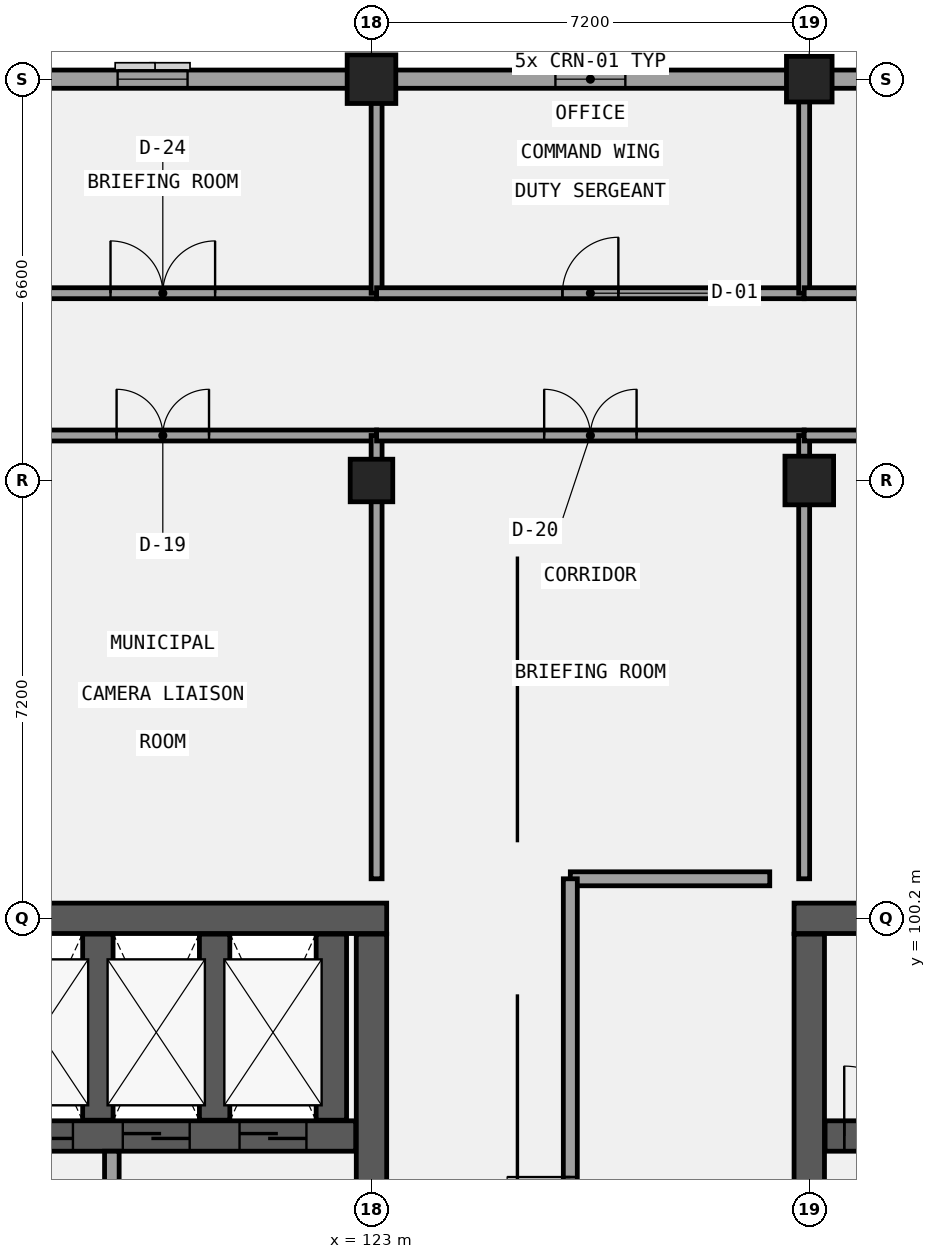
"""IFC4 building model, lengths in metres.
Left out: names, types, materials, properties, quantities, classifications, styles, units other than length and angle.
Written with IfcOpenShell. Run it as: python <this file> out.ifc"""

import sys

from ifc_helpers import new_model, si_unit, direction, frame, frame_2d, origin, origin_2d, place, context, subcontext, project, spatial, rectangle, extrude, element, fill, save


model = new_model("IFC4")
c1 = context("Model", 3, precision=1e-05, world=origin(), true_north=direction((0.0, 1.0)))
c2 = subcontext(c1, "Body", "Model", "MODEL_VIEW")
j1 = project(units=[si_unit("LENGTHUNIT", "METRE"), si_unit("PLANEANGLEUNIT", "RADIAN")], contexts=[c1])
p1 = place(None, origin())
s1 = spatial("IfcSite", under=j1, at=p1, CompositionType="ELEMENT")
p2 = place(p1, origin())
s2 = spatial("IfcBuilding", under=s1, at=p2, CompositionType="ELEMENT")
p3 = place(p2, frame((0.0, 0.0, 5.4)))
s3 = spatial("IfcBuildingStorey", under=s2, at=p3, CompositionType="ELEMENT", Elevation=5.4)
p4 = place(p3, frame((108.35, 100.2, 0.0), z_axis=(0.0, 0.0, 1.0), x_axis=(1.0, 0.0, 0.0)))
e1 = element("IfcWall", 1, at=p4, inside=s3, PredefinedType="SHEAR", context=c2, shape_type="SweptSolid", body=[
    extrude(rectangle(XDim=14.9, YDim=0.5, at=frame_2d((7.45, 0.0))), origin(), (0.0, 0.0, 1.0), 4.2),
])
p5 = place(p3, frame((123.0, 93.26, 0.0), z_axis=(0.0, 0.0, 1.0), x_axis=(0.0, 1.0, 0.0)))
e2 = element("IfcWall", 2, at=p5, inside=s3, PredefinedType="SHEAR", context=c2, shape_type="SweptSolid", body=[
    extrude(rectangle(XDim=6.68, YDim=0.5, at=frame_2d((3.34, 0.0))), origin(), (0.0, 0.0, 1.0), 4.2),
])
p6 = place(p3, frame((108.86, 96.62, 0.0), z_axis=(0.0, 0.0, 1.0), x_axis=(1.0, 0.0, 0.0)))
e3 = element("IfcWall", 3, at=p6, inside=s3, PredefinedType="SHEAR", context=c2, shape_type="SweptSolid", body=[
    extrude(rectangle(XDim=13.88, YDim=0.5, at=frame_2d((6.94, 0.0))), origin(), (0.0, 0.0, 1.0), 4.2),
])
p7 = place(p6, frame((8.13, 0.0, 0.0)))
e4 = element("IfcOpeningElement", 4, at=p7, cuts=e3, PredefinedType="OPENING", context=c2, shape_type="SweptSolid", body=[
    extrude(rectangle(XDim=1.1, YDim=2.15, at=frame_2d((0.55, 1.075))), frame((0.0, 0.26, 0.0), z_axis=(0.0, -1.0, 0.0), x_axis=(1.0, 0.0, 0.0)), (0.0, 0.0, 1.0), 0.52),
])
p8 = place(p6, frame((10.05, 0.0, 0.0)))
e5 = element("IfcOpeningElement", 5, at=p8, cuts=e3, PredefinedType="OPENING", context=c2, shape_type="SweptSolid", body=[
    extrude(rectangle(XDim=1.1, YDim=2.15, at=frame_2d((0.55, 1.075))), frame((0.0, 0.26, 0.0), z_axis=(0.0, -1.0, 0.0), x_axis=(1.0, 0.0, 0.0)), (0.0, 0.0, 1.0), 0.52),
])
p9 = place(p6, frame((11.97, 0.0, 0.0)))
e6 = element("IfcOpeningElement", 6, at=p9, cuts=e3, PredefinedType="OPENING", context=c2, shape_type="SweptSolid", body=[
    extrude(rectangle(XDim=1.1, YDim=2.15, at=frame_2d((0.55, 1.075))), frame((0.0, 0.26, 0.0), z_axis=(0.0, -1.0, 0.0), x_axis=(1.0, 0.0, 0.0)), (0.0, 0.0, 1.0), 0.52),
])
p10 = place(p6, frame((0.315, 0.0, 0.0)))
e7 = element("IfcOpeningElement", 7, at=p10, cuts=e3, PredefinedType="OPENING", context=c2, shape_type="SweptSolid", body=[
    extrude(rectangle(XDim=1.15, YDim=2.15, at=frame_2d((0.575, 1.075))), frame((0.0, 0.26, 0.0), z_axis=(0.0, -1.0, 0.0), x_axis=(1.0, 0.0, 0.0)), (0.0, 0.0, 1.0), 0.52),
])
for number, where, z_axis, x_axis in (
    (8, (118.5, 96.88, 0.0), (0.0, 0.0, 1.0), (0.0, 1.0, 0.0)),
    (9, (120.42, 96.88, 0.0), (0.0, 0.0, 1.0), (0.0, 1.0, 0.0)),
    (10, (122.34, 96.88, 0.0), (0.0, 0.0, 1.0), (0.0, 1.0, 0.0)),
):
    element("IfcWall", number, at=place(p3, frame(where, z_axis=z_axis, x_axis=x_axis)), inside=s3, PredefinedType="SHEAR", context=c2, shape_type="SweptSolid", body=[
        extrude(rectangle(XDim=3.06, YDim=0.5, at=frame_2d((1.53, 0.0))), origin(), (0.0, 0.0, 1.0), 4.2),
    ])
p11 = place(p3, frame((129.95, 100.2, 0.0), z_axis=(0.0, 0.0, 1.0), x_axis=(1.0, 0.0, 0.0)))
e11 = element("IfcWall", 11, at=p11, inside=s3, PredefinedType="SHEAR", context=c2, shape_type="SweptSolid", body=[
    extrude(rectangle(XDim=14.9, YDim=0.5, at=frame_2d((7.45, 0.0))), origin(), (0.0, 0.0, 1.0), 4.2),
])
p12 = place(p3, frame((130.2, 93.26, 0.0), z_axis=(0.0, 0.0, 1.0), x_axis=(0.0, 1.0, 0.0)))
e12 = element("IfcWall", 12, at=p12, inside=s3, PredefinedType="SHEAR", context=c2, shape_type="SweptSolid", body=[
    extrude(rectangle(XDim=6.68, YDim=0.5, at=frame_2d((3.34, 0.0))), origin(), (0.0, 0.0, 1.0), 4.2),
])
p13 = place(p3, frame((130.46, 96.62, 0.0), z_axis=(0.0, 0.0, 1.0), x_axis=(1.0, 0.0, 0.0)))
e13 = element("IfcWall", 13, at=p13, inside=s3, PredefinedType="SHEAR", context=c2, shape_type="SweptSolid", body=[
    extrude(rectangle(XDim=13.88, YDim=0.5, at=frame_2d((6.94, 0.0))), origin(), (0.0, 0.0, 1.0), 4.2),
])
p14 = place(p13, frame((8.13, 0.0, 0.0)))
e14 = element("IfcOpeningElement", 14, at=p14, cuts=e13, PredefinedType="OPENING", context=c2, shape_type="SweptSolid", body=[
    extrude(rectangle(XDim=1.1, YDim=2.15, at=frame_2d((0.55, 1.075))), frame((0.0, 0.26, 0.0), z_axis=(0.0, -1.0, 0.0), x_axis=(1.0, 0.0, 0.0)), (0.0, 0.0, 1.0), 0.52),
])
p15 = place(p13, frame((10.05, 0.0, 0.0)))
e15 = element("IfcOpeningElement", 15, at=p15, cuts=e13, PredefinedType="OPENING", context=c2, shape_type="SweptSolid", body=[
    extrude(rectangle(XDim=1.1, YDim=2.15, at=frame_2d((0.55, 1.075))), frame((0.0, 0.26, 0.0), z_axis=(0.0, -1.0, 0.0), x_axis=(1.0, 0.0, 0.0)), (0.0, 0.0, 1.0), 0.52),
])
p16 = place(p13, frame((11.97, 0.0, 0.0)))
e16 = element("IfcOpeningElement", 16, at=p16, cuts=e13, PredefinedType="OPENING", context=c2, shape_type="SweptSolid", body=[
    extrude(rectangle(XDim=1.1, YDim=2.15, at=frame_2d((0.55, 1.075))), frame((0.0, 0.26, 0.0), z_axis=(0.0, -1.0, 0.0), x_axis=(1.0, 0.0, 0.0)), (0.0, 0.0, 1.0), 0.52),
])
p17 = place(p13, frame((0.315, 0.0, 0.0)))
e17 = element("IfcOpeningElement", 17, at=p17, cuts=e13, PredefinedType="OPENING", context=c2, shape_type="SweptSolid", body=[
    extrude(rectangle(XDim=1.15, YDim=2.15, at=frame_2d((0.575, 1.075))), frame((0.0, 0.26, 0.0), z_axis=(0.0, -1.0, 0.0), x_axis=(1.0, 0.0, 0.0)), (0.0, 0.0, 1.0), 0.52),
])
p18 = place(p3, frame((123.0, 107.4, 0.0), z_axis=(0.0, 0.0, 1.0), x_axis=(1.0, 0.0, 0.0)))
e18 = element("IfcColumn", 18, at=p18, inside=s3, PredefinedType="COLUMN", context=c2, shape_type="SweptSolid", body=[
    extrude(rectangle(XDim=0.7, YDim=0.7, at=origin_2d()), origin(), (0.0, 0.0, 1.0), 4.2),
])
for number, where, z_axis, x_axis in (
    (19, (123.0, 114.0, 0.0), (0.0, 0.0, 1.0), (1.0, 0.0, 0.0)),
    (20, (130.2, 107.4, 0.0), (0.0, 0.0, 1.0), (1.0, 0.0, 0.0)),
):
    element("IfcColumn", number, at=place(p3, frame(where, z_axis=z_axis, x_axis=x_axis)), inside=s3, PredefinedType="COLUMN", context=c2, shape_type="SweptSolid", body=[
        extrude(rectangle(XDim=0.8, YDim=0.8, at=origin_2d()), origin(), (0.0, 0.0, 1.0), 4.2),
    ])
p19 = place(p3, frame((130.2, 114.0, 0.0), z_axis=(0.0, 0.0, 1.0), x_axis=(1.0, 0.0, 0.0)))
e21 = element("IfcColumn", 21, at=p19, inside=s3, PredefinedType="COLUMN", context=c2, shape_type="SweptSolid", body=[
    extrude(rectangle(XDim=0.75, YDim=0.75, at=origin_2d()), origin(), (0.0, 0.0, 1.0), 4.2),
])
p20 = place(p3, frame((118.73, 93.25, 0.0), z_axis=(0.0, 0.0, 1.0), x_axis=(0.0, 1.0, 0.0)))
e22 = element("IfcWall", 22, at=p20, inside=s3, PredefinedType="SOLIDWALL", context=c2, shape_type="SweptSolid", body=[
    extrude(rectangle(XDim=3.12, YDim=0.24, at=frame_2d((1.56, 0.0))), origin(), (0.0, 0.0, 1.0), 3.89),
])
p21 = place(p3, frame((144.75, 114.0, 0.0), z_axis=(0.0, 0.0, 1.0), x_axis=(-1.0, 0.0, 0.0)))
e23 = element("IfcWall", 23, at=p21, inside=s3, PredefinedType="SOLIDWALL", context=c2, shape_type="SweptSolid", body=[
    extrude(rectangle(XDim=36.3, YDim=0.3, at=frame_2d((18.15, 0.0))), origin(), (0.0, 0.0, 1.0), 3.17),
])
p22 = place(p21, frame((32.05, 0.0, 0.95)))
e24 = element("IfcOpeningElement", 24, at=p22, cuts=e23, PredefinedType="OPENING", context=c2, shape_type="SweptSolid", body=[
    extrude(rectangle(XDim=1.0, YDim=1.9, at=frame_2d((0.5, 0.95))), frame((0.0, 0.16, 0.0), z_axis=(0.0, -1.0, 0.0), x_axis=(1.0, 0.0, 0.0)), (0.0, 0.0, 1.0), 0.32),
])
p23 = place(p21, frame((24.775, 0.0, 0.95)))
e25 = element("IfcOpeningElement", 25, at=p23, cuts=e23, PredefinedType="OPENING", context=c2, shape_type="SweptSolid", body=[
    extrude(rectangle(XDim=1.15, YDim=1.4, at=frame_2d((0.575, 0.7))), frame((0.0, 0.16, 0.0), z_axis=(0.0, -1.0, 0.0), x_axis=(1.0, 0.0, 0.0)), (0.0, 0.0, 1.0), 0.32),
])
p24 = place(p21, frame((17.575, 0.0, 0.95)))
e26 = element("IfcOpeningElement", 26, at=p24, cuts=e23, PredefinedType="OPENING", context=c2, shape_type="SweptSolid", body=[
    extrude(rectangle(XDim=1.15, YDim=1.65, at=frame_2d((0.575, 0.825))), frame((0.0, 0.16, 0.0), z_axis=(0.0, -1.0, 0.0), x_axis=(1.0, 0.0, 0.0)), (0.0, 0.0, 1.0), 0.32),
])
p25 = place(p21, frame((10.375, 0.0, 0.95)))
e27 = element("IfcOpeningElement", 27, at=p25, cuts=e23, PredefinedType="OPENING", context=c2, shape_type="SweptSolid", body=[
    extrude(rectangle(XDim=1.15, YDim=1.9, at=frame_2d((0.575, 0.95))), frame((0.0, 0.16, 0.0), z_axis=(0.0, -1.0, 0.0), x_axis=(1.0, 0.0, 0.0)), (0.0, 0.0, 1.0), 0.32),
])
p26 = place(p21, frame((3.1, 0.0, 0.95)))
e28 = element("IfcOpeningElement", 28, at=p26, cuts=e23, PredefinedType="OPENING", context=c2, shape_type="SweptSolid", body=[
    extrude(rectangle(XDim=1.3, YDim=1.4, at=frame_2d((0.65, 0.7))), frame((0.0, 0.16, 0.0), z_axis=(0.0, -1.0, 0.0), x_axis=(1.0, 0.0, 0.0)), (0.0, 0.0, 1.0), 0.32),
])
p27 = place(p3, frame((116.052, 108.14, 0.0), z_axis=(0.0, 0.0, 1.0), x_axis=(1.0, 0.0, 0.0)))
e29 = element("IfcWall", 29, at=p27, inside=s3, PredefinedType="PARTITIONING", context=c2, shape_type="SweptSolid", body=[
    extrude(rectangle(XDim=7.032, YDim=0.18, at=frame_2d((3.516, 0.0))), origin(), (0.0, 0.0, 1.0), 3.92),
])
p28 = place(p27, frame((2.756, 0.0, 0.0)))
e30 = element("IfcOpeningElement", 30, at=p28, cuts=e29, PredefinedType="OPENING", context=c2, shape_type="SweptSolid", body=[
    extrude(rectangle(XDim=1.52, YDim=2.1, at=frame_2d((0.76, 1.05))), frame((0.0, 0.1, 0.0), z_axis=(0.0, -1.0, 0.0), x_axis=(1.0, 0.0, 0.0)), (0.0, 0.0, 1.0), 0.2),
])
p29 = place(p3, frame((123.084, 100.85, 0.0), z_axis=(0.0, 0.0, 1.0), x_axis=(0.0, 1.0, 0.0)))
e31 = element("IfcWall", 31, at=p29, inside=s3, PredefinedType="PARTITIONING", context=c2, shape_type="SweptSolid", body=[
    extrude(rectangle(XDim=7.29, YDim=0.18, at=frame_2d((3.645, 0.0))), origin(), (0.0, 0.0, 1.0), 3.27),
])
p30 = place(p3, frame((123.084, 108.14, 0.0), z_axis=(0.0, 0.0, 1.0), x_axis=(1.0, 0.0, 0.0)))
e32 = element("IfcWall", 32, at=p30, inside=s3, PredefinedType="PARTITIONING", context=c2, shape_type="SweptSolid", body=[
    extrude(rectangle(XDim=7.032, YDim=0.18, at=frame_2d((3.516, 0.0))), origin(), (0.0, 0.0, 1.0), 3.92),
])
p31 = place(p30, frame((2.756, 0.0, 0.0)))
e33 = element("IfcOpeningElement", 33, at=p31, cuts=e32, PredefinedType="OPENING", context=c2, shape_type="SweptSolid", body=[
    extrude(rectangle(XDim=1.52, YDim=2.22, at=frame_2d((0.76, 1.11))), frame((0.0, 0.1, 0.0), z_axis=(0.0, -1.0, 0.0), x_axis=(1.0, 0.0, 0.0)), (0.0, 0.0, 1.0), 0.2),
])
p32 = place(p3, frame((130.116, 100.85, 0.0), z_axis=(0.0, 0.0, 1.0), x_axis=(0.0, 1.0, 0.0)))
e34 = element("IfcWall", 34, at=p32, inside=s3, PredefinedType="PARTITIONING", context=c2, shape_type="SweptSolid", body=[
    extrude(rectangle(XDim=7.29, YDim=0.18, at=frame_2d((3.645, 0.0))), origin(), (0.0, 0.0, 1.0), 3.17),
])
p33 = place(p3, frame((130.116, 108.14, 0.0), z_axis=(0.0, 0.0, 1.0), x_axis=(1.0, 0.0, 0.0)))
e35 = element("IfcWall", 35, at=p33, inside=s3, PredefinedType="PARTITIONING", context=c2, shape_type="SweptSolid", body=[
    extrude(rectangle(XDim=7.032, YDim=0.18, at=frame_2d((3.516, 0.0))), origin(), (0.0, 0.0, 1.0), 3.92),
])
p34 = place(p33, frame((2.756, 0.0, 0.0)))
e36 = element("IfcOpeningElement", 36, at=p34, cuts=e35, PredefinedType="OPENING", context=c2, shape_type="SweptSolid", body=[
    extrude(rectangle(XDim=1.52, YDim=2.35, at=frame_2d((0.76, 1.175))), frame((0.0, 0.1, 0.0), z_axis=(0.0, -1.0, 0.0), x_axis=(1.0, 0.0, 0.0)), (0.0, 0.0, 1.0), 0.2),
])
p35 = place(p3, frame((116.052, 110.48, 0.0), z_axis=(0.0, 0.0, 1.0), x_axis=(1.0, 0.0, 0.0)))
e37 = element("IfcWall", 37, at=p35, inside=s3, PredefinedType="PARTITIONING", context=c2, shape_type="SweptSolid", body=[
    extrude(rectangle(XDim=7.032, YDim=0.18, at=frame_2d((3.516, 0.0))), origin(), (0.0, 0.0, 1.0), 3.37),
])
p36 = place(p35, frame((2.656, 0.0, 0.0)))
e38 = element("IfcOpeningElement", 38, at=p36, cuts=e37, PredefinedType="OPENING", context=c2, shape_type="SweptSolid", body=[
    extrude(rectangle(XDim=1.72, YDim=2.35, at=frame_2d((0.86, 1.175))), frame((0.0, 0.1, 0.0), z_axis=(0.0, -1.0, 0.0), x_axis=(1.0, 0.0, 0.0)), (0.0, 0.0, 1.0), 0.2),
])
p37 = place(p3, frame((123.084, 110.48, 0.0), z_axis=(0.0, 0.0, 1.0), x_axis=(0.0, 1.0, 0.0)))
e39 = element("IfcWall", 39, at=p37, inside=s3, PredefinedType="PARTITIONING", context=c2, shape_type="SweptSolid", body=[
    extrude(rectangle(XDim=3.34, YDim=0.18, at=frame_2d((1.67, 0.0))), origin(), (0.0, 0.0, 1.0), 3.27),
])
p38 = place(p3, frame((123.084, 110.48, 0.0), z_axis=(0.0, 0.0, 1.0), x_axis=(1.0, 0.0, 0.0)))
e40 = element("IfcWall", 40, at=p38, inside=s3, PredefinedType="PARTITIONING", context=c2, shape_type="SweptSolid", body=[
    extrude(rectangle(XDim=7.032, YDim=0.18, at=frame_2d((3.516, 0.0))), origin(), (0.0, 0.0, 1.0), 3.37),
])
p39 = place(p38, frame((3.056, 0.0, 0.0)))
e41 = element("IfcOpeningElement", 41, at=p39, cuts=e40, PredefinedType="OPENING", context=c2, shape_type="SweptSolid", body=[
    extrude(rectangle(XDim=0.92, YDim=2.1, at=frame_2d((0.46, 1.05))), frame((0.0, 0.1, 0.0), z_axis=(0.0, -1.0, 0.0), x_axis=(1.0, 0.0, 0.0)), (0.0, 0.0, 1.0), 0.2),
])
p40 = place(p3, frame((130.116, 110.48, 0.0), z_axis=(0.0, 0.0, 1.0), x_axis=(0.0, 1.0, 0.0)))
e42 = element("IfcWall", 42, at=p40, inside=s3, PredefinedType="PARTITIONING", context=c2, shape_type="SweptSolid", body=[
    extrude(rectangle(XDim=3.34, YDim=0.18, at=frame_2d((1.67, 0.0))), origin(), (0.0, 0.0, 1.0), 3.17),
])
p41 = place(p3, frame((130.116, 110.48, 0.0), z_axis=(0.0, 0.0, 1.0), x_axis=(1.0, 0.0, 0.0)))
e43 = element("IfcWall", 43, at=p41, inside=s3, PredefinedType="PARTITIONING", context=c2, shape_type="SweptSolid", body=[
    extrude(rectangle(XDim=7.032, YDim=0.18, at=frame_2d((3.516, 0.0))), origin(), (0.0, 0.0, 1.0), 3.37),
])
p42 = place(p41, frame((3.056, 0.0, 0.0)))
e44 = element("IfcOpeningElement", 44, at=p42, cuts=e43, PredefinedType="OPENING", context=c2, shape_type="SweptSolid", body=[
    extrude(rectangle(XDim=0.92, YDim=2.22, at=frame_2d((0.46, 1.11))), frame((0.0, 0.1, 0.0), z_axis=(0.0, -1.0, 0.0), x_axis=(1.0, 0.0, 0.0)), (0.0, 0.0, 1.0), 0.2),
])
p43 = place(p3, frame((126.27, 100.85, 0.0), z_axis=(0.0, 0.0, 1.0), x_axis=(1.0, 0.0, 0.0)))
e45 = element("IfcWall", 45, at=p43, inside=s3, PredefinedType="PARTITIONING", context=c2, shape_type="SweptSolid", body=[
    extrude(rectangle(XDim=3.28, YDim=0.23, at=frame_2d((1.64, 0.0))), origin(), (0.0, 0.0, 1.0), 3.92),
])
p44 = place(p3, frame((126.27, 90.0, 0.0), z_axis=(0.0, 0.0, 1.0), x_axis=(0.0, 1.0, 0.0)))
e46 = element("IfcWall", 46, at=p44, inside=s3, PredefinedType="PARTITIONING", context=c2, shape_type="SweptSolid", body=[
    extrude(rectangle(XDim=10.85, YDim=0.23, at=frame_2d((5.425, 0.0))), origin(), (0.0, 0.0, 1.0), 3.92),
])
p45 = place(p44, frame((4.905, 0.0, 0.0)))
e47 = element("IfcOpeningElement", 47, at=p45, cuts=e46, PredefinedType="OPENING", context=c2, shape_type="SweptSolid", body=[
    extrude(rectangle(XDim=1.04, YDim=2.35, at=frame_2d((0.52, 1.175))), frame((0.0, 0.125, 0.0), z_axis=(0.0, -1.0, 0.0), x_axis=(1.0, 0.0, 0.0)), (0.0, 0.0, 1.0), 0.25),
])
p46 = place(p7, frame((1.1, 0.0, 0.0), z_axis=(0.0, 0.0, 1.0), x_axis=(-1.0, 0.0, 0.0)))
e48 = element("IfcDoor", 48, at=p46, inside=s3, OperationType="DOUBLE_DOOR_SLIDING", PredefinedType="DOOR", context=c2, shape_type="SweptSolid", body=[
    extrude(rectangle(XDim=1.1, YDim=2.15, at=frame_2d((0.55, 1.075))), frame((0.0, 0.025, 0.0), z_axis=(0.0, -1.0, 0.0), x_axis=(1.0, 0.0, 0.0)), (0.0, 0.0, 1.0), 0.05),
])
fill(e4, e48)
p47 = place(p8, frame((1.1, 0.0, 0.0), z_axis=(0.0, 0.0, 1.0), x_axis=(-1.0, 0.0, 0.0)))
e49 = element("IfcDoor", 49, at=p47, inside=s3, OperationType="DOUBLE_DOOR_SLIDING", PredefinedType="DOOR", context=c2, shape_type="SweptSolid", body=[
    extrude(rectangle(XDim=1.1, YDim=2.15, at=frame_2d((0.55, 1.075))), frame((0.0, 0.025, 0.0), z_axis=(0.0, -1.0, 0.0), x_axis=(1.0, 0.0, 0.0)), (0.0, 0.0, 1.0), 0.05),
])
fill(e5, e49)
p48 = place(p9, frame((1.1, 0.0, 0.0), z_axis=(0.0, 0.0, 1.0), x_axis=(-1.0, 0.0, 0.0)))
e50 = element("IfcDoor", 50, at=p48, inside=s3, OperationType="DOUBLE_DOOR_SLIDING", PredefinedType="DOOR", context=c2, shape_type="SweptSolid", body=[
    extrude(rectangle(XDim=1.1, YDim=2.15, at=frame_2d((0.55, 1.075))), frame((0.0, 0.025, 0.0), z_axis=(0.0, -1.0, 0.0), x_axis=(1.0, 0.0, 0.0)), (0.0, 0.0, 1.0), 0.05),
])
fill(e6, e50)
p49 = place(p17, origin())
e51 = element("IfcDoor", 51, at=p49, inside=s3, OperationType="SINGLE_SWING_LEFT", PredefinedType="DOOR", context=c2, shape_type="SweptSolid", body=[
    extrude(rectangle(XDim=1.15, YDim=2.15, at=frame_2d((0.575, 1.075))), frame((0.0, 0.025, 0.0), z_axis=(0.0, -1.0, 0.0), x_axis=(1.0, 0.0, 0.0)), (0.0, 0.0, 1.0), 0.05),
])
fill(e17, e51)
p50 = place(p23, origin())
e52 = element("IfcWindow", 52, at=p50, inside=s3, PartitioningType="SINGLE_PANEL", PredefinedType="WINDOW", context=c2, shape_type="SweptSolid", body=[
    extrude(rectangle(XDim=1.15, YDim=1.4, at=frame_2d((0.575, 0.7))), frame((0.0, 0.03, 0.0), z_axis=(0.0, -1.0, 0.0), x_axis=(1.0, 0.0, 0.0)), (0.0, 0.0, 1.0), 0.06),
])
fill(e25, e52)
p51 = place(p24, origin())
e53 = element("IfcWindow", 53, at=p51, inside=s3, PartitioningType="SINGLE_PANEL", PredefinedType="WINDOW", context=c2, shape_type="SweptSolid", body=[
    extrude(rectangle(XDim=1.15, YDim=1.65, at=frame_2d((0.575, 0.825))), frame((0.0, 0.03, 0.0), z_axis=(0.0, -1.0, 0.0), x_axis=(1.0, 0.0, 0.0)), (0.0, 0.0, 1.0), 0.06),
])
fill(e26, e53)
p52 = place(p28, frame((1.52, 0.0, 0.0), z_axis=(0.0, 0.0, 1.0), x_axis=(-1.0, 0.0, 0.0)))
e54 = element("IfcDoor", 54, at=p52, inside=s3, OperationType="DOUBLE_DOOR_SINGLE_SWING", PredefinedType="DOOR", context=c2, shape_type="SweptSolid", body=[
    extrude(rectangle(XDim=1.52, YDim=2.1, at=frame_2d((0.76, 1.05))), frame((0.0, 0.025, 0.0), z_axis=(0.0, -1.0, 0.0), x_axis=(1.0, 0.0, 0.0)), (0.0, 0.0, 1.0), 0.05),
])
fill(e30, e54)
p53 = place(p31, frame((1.52, 0.0, 0.0), z_axis=(0.0, 0.0, 1.0), x_axis=(-1.0, 0.0, 0.0)))
e55 = element("IfcDoor", 55, at=p53, inside=s3, OperationType="DOUBLE_DOOR_SINGLE_SWING", PredefinedType="DOOR", context=c2, shape_type="SweptSolid", body=[
    extrude(rectangle(XDim=1.52, YDim=2.22, at=frame_2d((0.76, 1.11))), frame((0.0, 0.025, 0.0), z_axis=(0.0, -1.0, 0.0), x_axis=(1.0, 0.0, 0.0)), (0.0, 0.0, 1.0), 0.05),
])
fill(e33, e55)
p54 = place(p36, origin())
e56 = element("IfcDoor", 56, at=p54, inside=s3, OperationType="DOUBLE_DOOR_SINGLE_SWING", PredefinedType="DOOR", context=c2, shape_type="SweptSolid", body=[
    extrude(rectangle(XDim=1.72, YDim=2.35, at=frame_2d((0.86, 1.175))), frame((0.0, 0.025, 0.0), z_axis=(0.0, -1.0, 0.0), x_axis=(1.0, 0.0, 0.0)), (0.0, 0.0, 1.0), 0.05),
])
fill(e38, e56)
p55 = place(p39, origin())
e57 = element("IfcDoor", 57, at=p55, inside=s3, OperationType="SINGLE_SWING_RIGHT", PredefinedType="DOOR", context=c2, shape_type="SweptSolid", body=[
    extrude(rectangle(XDim=0.92, YDim=2.1, at=frame_2d((0.46, 1.05))), frame((0.0, 0.025, 0.0), z_axis=(0.0, -1.0, 0.0), x_axis=(1.0, 0.0, 0.0)), (0.0, 0.0, 1.0), 0.05),
])
fill(e41, e57)
p56 = place(p45, origin())
e58 = element("IfcDoor", 58, at=p56, inside=s3, OperationType="SINGLE_SWING_RIGHT", PredefinedType="DOOR", context=c2, shape_type="SweptSolid", body=[
    extrude(rectangle(XDim=1.04, YDim=2.35, at=frame_2d((0.52, 1.175))), frame((0.0, 0.025, 0.0), z_axis=(0.0, -1.0, 0.0), x_axis=(1.0, 0.0, 0.0)), (0.0, 0.0, 1.0), 0.05),
])
fill(e47, e58)
save(model, sys.argv[1])
